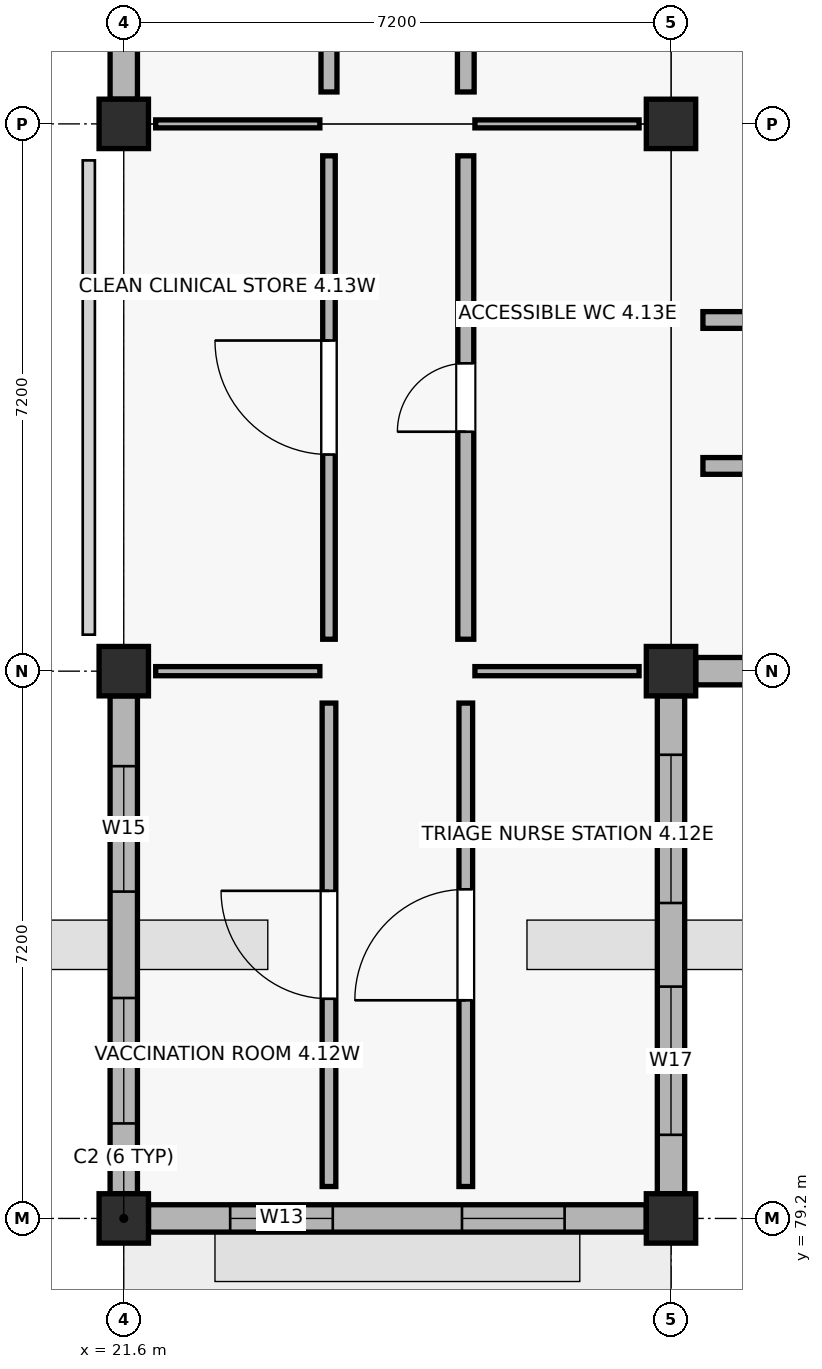
"""IFC4 building model, lengths in metres.
Left out: names, types, materials, properties, quantities, classifications, styles, units other than length and angle.
Written with IfcOpenShell. Run it as: python <this file> out.ifc"""

import sys

from ifc_helpers import new_model, si_unit, direction, frame, frame_2d, origin, origin_2d, place, context, subcontext, project, spatial, rectangle, extrude, element, fill, save


model = new_model("IFC4")
c1 = context("Model", 3, precision=1e-05, world=origin(), true_north=direction((0.0, 1.0)))
c2 = subcontext(c1, "Body", "Model", "MODEL_VIEW")
j1 = project(units=[si_unit("LENGTHUNIT", "METRE"), si_unit("PLANEANGLEUNIT", "RADIAN")], contexts=[c1])
p1 = place(None, origin())
s1 = spatial("IfcSite", under=j1, at=p1, CompositionType="ELEMENT")
p2 = place(p1, origin())
s2 = spatial("IfcBuilding", under=s1, at=p2, CompositionType="ELEMENT")
p3 = place(p2, origin())
s3 = spatial("IfcBuildingStorey", under=s2, at=p3, CompositionType="ELEMENT", Elevation=0.0)
for number, where, z_axis, x_axis in (
    (1, (21.6, 79.2, -0.25), (0.0, 0.0, 1.0), (1.0, 0.0, 0.0)),
    (2, (21.6, 86.4, -0.25), (0.0, 0.0, 1.0), (1.0, 0.0, 0.0)),
    (3, (21.6, 93.6, -0.25), (0.0, 0.0, 1.0), (1.0, 0.0, 0.0)),
    (4, (28.8, 79.2, -0.25), (0.0, 0.0, 1.0), (1.0, 0.0, 0.0)),
    (5, (28.8, 86.4, -0.25), (0.0, 0.0, 1.0), (1.0, 0.0, 0.0)),
    (6, (28.8, 93.6, -0.25), (0.0, 0.0, 1.0), (1.0, 0.0, 0.0)),
):
    element("IfcColumn", number, at=place(p3, frame(where, z_axis=z_axis, x_axis=x_axis)), inside=s3, PredefinedType="COLUMN", context=c2, shape_type="SweptSolid", body=[
        extrude(rectangle(XDim=0.65, YDim=0.65, at=origin_2d()), origin(), (0.0, 0.0, 1.0), 4.75),
    ])
p4 = place(p3, frame((21.925, 79.2, 0.0), z_axis=(0.0, 0.0, 1.0), x_axis=(1.0, 0.0, 0.0)))
e7 = element("IfcWall", 7, at=p4, inside=s3, PredefinedType="SOLIDWALL", context=c2, shape_type="SweptSolid", body=[
    extrude(rectangle(XDim=6.55, YDim=0.36, at=frame_2d((3.275, 0.0))), origin(), (0.0, 0.0, 1.0), 3.47),
])
p5 = place(p4, frame((1.075, 0.0, 0.9)))
e8 = element("IfcOpeningElement", 8, at=p5, cuts=e7, PredefinedType="OPENING", context=c2, shape_type="SweptSolid", body=[
    extrude(rectangle(XDim=1.35, YDim=1.38, at=frame_2d((0.675, 0.69))), frame((0.0, 0.19, 0.0), z_axis=(0.0, -1.0, 0.0), x_axis=(1.0, 0.0, 0.0)), (0.0, 0.0, 1.0), 0.38),
])
p6 = place(p4, frame((4.125, 0.0, 0.9)))
e9 = element("IfcOpeningElement", 9, at=p6, cuts=e7, PredefinedType="OPENING", context=c2, shape_type="SweptSolid", body=[
    extrude(rectangle(XDim=1.35, YDim=1.38, at=frame_2d((0.675, 0.69))), frame((0.0, 0.19, 0.0), z_axis=(0.0, -1.0, 0.0), x_axis=(1.0, 0.0, 0.0)), (0.0, 0.0, 1.0), 0.38),
])
p7 = place(p3, frame((21.6, 86.075, 0.0), z_axis=(0.0, 0.0, 1.0), x_axis=(0.0, -1.0, 0.0)))
e10 = element("IfcWall", 10, at=p7, inside=s3, PredefinedType="SOLIDWALL", context=c2, shape_type="SweptSolid", body=[
    extrude(rectangle(XDim=6.55, YDim=0.36, at=frame_2d((3.275, 0.0))), origin(), (0.0, 0.0, 1.0), 3.52),
])
p8 = place(p7, frame((0.925, 0.0, 0.9)))
e11 = element("IfcOpeningElement", 11, at=p8, cuts=e10, PredefinedType="OPENING", context=c2, shape_type="SweptSolid", body=[
    extrude(rectangle(XDim=1.65, YDim=1.38, at=frame_2d((0.825, 0.69))), frame((0.0, 0.19, 0.0), z_axis=(0.0, -1.0, 0.0), x_axis=(1.0, 0.0, 0.0)), (0.0, 0.0, 1.0), 0.38),
])
p9 = place(p7, frame((3.975, 0.0, 0.9)))
e12 = element("IfcOpeningElement", 12, at=p9, cuts=e10, PredefinedType="OPENING", context=c2, shape_type="SweptSolid", body=[
    extrude(rectangle(XDim=1.65, YDim=1.38, at=frame_2d((0.825, 0.69))), frame((0.0, 0.19, 0.0), z_axis=(0.0, -1.0, 0.0), x_axis=(1.0, 0.0, 0.0)), (0.0, 0.0, 1.0), 0.38),
])
p10 = place(p3, frame((28.8, 79.525, 0.0), z_axis=(0.0, 0.0, 1.0), x_axis=(0.0, 1.0, 0.0)))
e13 = element("IfcWall", 13, at=p10, inside=s3, PredefinedType="SOLIDWALL", context=c2, shape_type="SweptSolid", body=[
    extrude(rectangle(XDim=6.55, YDim=0.36, at=frame_2d((3.275, 0.0))), origin(), (0.0, 0.0, 1.0), 3.52),
])
p11 = place(p10, frame((0.775, 0.0, 0.9)))
e14 = element("IfcOpeningElement", 14, at=p11, cuts=e13, PredefinedType="OPENING", context=c2, shape_type="SweptSolid", body=[
    extrude(rectangle(XDim=1.95, YDim=1.38, at=frame_2d((0.975, 0.69))), frame((0.0, 0.19, 0.0), z_axis=(0.0, -1.0, 0.0), x_axis=(1.0, 0.0, 0.0)), (0.0, 0.0, 1.0), 0.38),
])
p12 = place(p10, frame((3.825, 0.0, 0.9)))
e15 = element("IfcOpeningElement", 15, at=p12, cuts=e13, PredefinedType="OPENING", context=c2, shape_type="SweptSolid", body=[
    extrude(rectangle(XDim=1.95, YDim=1.38, at=frame_2d((0.975, 0.69))), frame((0.0, 0.19, 0.0), z_axis=(0.0, -1.0, 0.0), x_axis=(1.0, 0.0, 0.0)), (0.0, 0.0, 1.0), 0.38),
])
p13 = place(p3, frame((21.6, 100.45, 0.0), z_axis=(0.0, 0.0, 1.0), x_axis=(0.0, -1.0, 0.0)))
e16 = element("IfcWall", 16, at=p13, inside=s3, PredefinedType="SOLIDWALL", context=c2, shape_type="SweptSolid", body=[
    extrude(rectangle(XDim=6.525, YDim=0.36, at=frame_2d((3.262, 0.0))), origin(), (0.0, 0.0, 1.0), 3.52),
])
p14 = place(p13, frame((1.15, 0.0, 0.9)))
e17 = element("IfcOpeningElement", 17, at=p14, cuts=e16, PredefinedType="OPENING", context=c2, shape_type="SweptSolid", body=[
    extrude(rectangle(XDim=1.2, YDim=1.5, at=frame_2d((0.6, 0.75))), frame((0.0, 0.19, 0.0), z_axis=(0.0, -1.0, 0.0), x_axis=(1.0, 0.0, 0.0)), (0.0, 0.0, 1.0), 0.38),
])
p15 = place(p13, frame((4.175, 0.0, 0.9)))
e18 = element("IfcOpeningElement", 18, at=p15, cuts=e16, PredefinedType="OPENING", context=c2, shape_type="SweptSolid", body=[
    extrude(rectangle(XDim=1.2, YDim=1.5, at=frame_2d((0.6, 0.75))), frame((0.0, 0.19, 0.0), z_axis=(0.0, -1.0, 0.0), x_axis=(1.0, 0.0, 0.0)), (0.0, 0.0, 1.0), 0.38),
])
p16 = place(p3, frame((29.125, 86.4, 0.0), z_axis=(0.0, 0.0, 1.0), x_axis=(1.0, 0.0, 0.0)))
e19 = element("IfcWall", 19, at=p16, inside=s3, PredefinedType="SOLIDWALL", context=c2, shape_type="SweptSolid", body=[
    extrude(rectangle(XDim=6.575, YDim=0.36, at=frame_2d((3.288, 0.0))), origin(), (0.0, 0.0, 1.0), 3.47),
])
p17 = place(p16, frame((0.675, 0.0, 0.9)))
e20 = element("IfcOpeningElement", 20, at=p17, cuts=e19, PredefinedType="OPENING", context=c2, shape_type="SweptSolid", body=[
    extrude(rectangle(XDim=2.15, YDim=1.5, at=frame_2d((1.075, 0.75))), frame((0.0, 0.19, 0.0), z_axis=(0.0, -1.0, 0.0), x_axis=(1.0, 0.0, 0.0)), (0.0, 0.0, 1.0), 0.38),
])
p18 = place(p16, frame((3.75, 0.0, 0.9)))
e21 = element("IfcOpeningElement", 21, at=p18, cuts=e19, PredefinedType="OPENING", context=c2, shape_type="SweptSolid", body=[
    extrude(rectangle(XDim=2.15, YDim=1.5, at=frame_2d((1.075, 0.75))), frame((0.0, 0.19, 0.0), z_axis=(0.0, -1.0, 0.0), x_axis=(1.0, 0.0, 0.0)), (0.0, 0.0, 1.0), 0.38),
])
p19 = place(p3, frame((29.22, 89.1, 0.0), z_axis=(0.0, 0.0, 1.0), x_axis=(1.0, 0.0, 0.0)))
e22 = element("IfcWall", 22, at=p19, inside=s3, PredefinedType="SOLIDWALL", context=c2, shape_type="SweptSolid", body=[
    extrude(rectangle(XDim=6.36, YDim=0.22, at=frame_2d((3.18, 0.0))), origin(), (0.0, 0.0, 1.0), 3.36),
])
p20 = place(p19, frame((2.55, 0.0, 0.0)))
e23 = element("IfcOpeningElement", 23, at=p20, cuts=e22, PredefinedType="OPENING", context=c2, shape_type="SweptSolid", body=[
    extrude(rectangle(XDim=1.26, YDim=2.09, at=frame_2d((0.63, 1.045))), frame((0.0, 0.12, 0.0), z_axis=(0.0, -1.0, 0.0), x_axis=(1.0, 0.0, 0.0)), (0.0, 0.0, 1.0), 0.24),
])
p21 = place(p3, frame((29.22, 91.02, 0.0), z_axis=(0.0, 0.0, 1.0), x_axis=(1.0, 0.0, 0.0)))
e24 = element("IfcWall", 24, at=p21, inside=s3, PredefinedType="SOLIDWALL", context=c2, shape_type="SweptSolid", body=[
    extrude(rectangle(XDim=6.36, YDim=0.22, at=frame_2d((3.18, 0.0))), origin(), (0.0, 0.0, 1.0), 3.36),
])
p22 = place(p21, frame((2.53, 0.0, 0.0)))
e25 = element("IfcOpeningElement", 25, at=p22, cuts=e24, PredefinedType="OPENING", context=c2, shape_type="SweptSolid", body=[
    extrude(rectangle(XDim=1.3, YDim=2.09, at=frame_2d((0.65, 1.045))), frame((0.0, 0.12, 0.0), z_axis=(0.0, -1.0, 0.0), x_axis=(1.0, 0.0, 0.0)), (0.0, 0.0, 1.0), 0.24),
])
p23 = place(p3, frame((24.3, 79.62, 0.0), z_axis=(0.0, 0.0, 1.0), x_axis=(0.0, 1.0, 0.0)))
e26 = element("IfcWall", 26, at=p23, inside=s3, PredefinedType="PARTITIONING", context=c2, shape_type="SweptSolid", body=[
    extrude(rectangle(XDim=6.36, YDim=0.18, at=frame_2d((3.18, 0.0))), origin(), (0.0, 0.0, 1.0), 3.36),
])
p24 = place(p23, frame((2.47, 0.0, 0.0)))
e27 = element("IfcOpeningElement", 27, at=p24, cuts=e26, PredefinedType="OPENING", context=c2, shape_type="SweptSolid", body=[
    extrude(rectangle(XDim=1.42, YDim=2.09, at=frame_2d((0.71, 1.045))), frame((0.0, 0.1, 0.0), z_axis=(0.0, -1.0, 0.0), x_axis=(1.0, 0.0, 0.0)), (0.0, 0.0, 1.0), 0.2),
])
p25 = place(p3, frame((22.02, 86.4, 0.0), z_axis=(0.0, 0.0, 1.0), x_axis=(1.0, 0.0, 0.0)))
e28 = element("IfcWall", 28, at=p25, inside=s3, PredefinedType="PARTITIONING", context=c2, shape_type="SweptSolid", body=[
    extrude(rectangle(XDim=2.16, YDim=0.12, at=frame_2d((1.08, 0.0))), origin(), (0.0, 0.0, 1.0), 3.36),
])
p26 = place(p3, frame((26.1, 79.62, 0.0), z_axis=(0.0, 0.0, 1.0), x_axis=(0.0, 1.0, 0.0)))
e29 = element("IfcWall", 29, at=p26, inside=s3, PredefinedType="PARTITIONING", context=c2, shape_type="SweptSolid", body=[
    extrude(rectangle(XDim=6.36, YDim=0.18, at=frame_2d((3.18, 0.0))), origin(), (0.0, 0.0, 1.0), 3.36),
])
p27 = place(p26, frame((2.45, 0.0, 0.0)))
e30 = element("IfcOpeningElement", 30, at=p27, cuts=e29, PredefinedType="OPENING", context=c2, shape_type="SweptSolid", body=[
    extrude(rectangle(XDim=1.46, YDim=2.09, at=frame_2d((0.73, 1.045))), frame((0.0, 0.1, 0.0), z_axis=(0.0, -1.0, 0.0), x_axis=(1.0, 0.0, 0.0)), (0.0, 0.0, 1.0), 0.2),
])
p28 = place(p3, frame((26.22, 86.4, 0.0), z_axis=(0.0, 0.0, 1.0), x_axis=(1.0, 0.0, 0.0)))
e31 = element("IfcWall", 31, at=p28, inside=s3, PredefinedType="PARTITIONING", context=c2, shape_type="SweptSolid", body=[
    extrude(rectangle(XDim=2.16, YDim=0.12, at=frame_2d((1.08, 0.0))), origin(), (0.0, 0.0, 1.0), 3.36),
])
p29 = place(p3, frame((24.3, 86.82, 0.0), z_axis=(0.0, 0.0, 1.0), x_axis=(0.0, 1.0, 0.0)))
e32 = element("IfcWall", 32, at=p29, inside=s3, PredefinedType="PARTITIONING", context=c2, shape_type="SweptSolid", body=[
    extrude(rectangle(XDim=6.36, YDim=0.165, at=frame_2d((3.18, 0.0))), origin(), (0.0, 0.0, 1.0), 3.36),
])
p30 = place(p29, frame((2.43, 0.0, 0.0)))
e33 = element("IfcOpeningElement", 33, at=p30, cuts=e32, PredefinedType="OPENING", context=c2, shape_type="SweptSolid", body=[
    extrude(rectangle(XDim=1.5, YDim=2.09, at=frame_2d((0.75, 1.045))), frame((0.0, 0.093, 0.0), z_axis=(0.0, -1.0, 0.0), x_axis=(1.0, 0.0, 0.0)), (0.0, 0.0, 1.0), 0.185),
])
p31 = place(p3, frame((22.02, 93.6, 0.0), z_axis=(0.0, 0.0, 1.0), x_axis=(1.0, 0.0, 0.0)))
e34 = element("IfcWall", 34, at=p31, inside=s3, PredefinedType="PARTITIONING", context=c2, shape_type="SweptSolid", body=[
    extrude(rectangle(XDim=2.16, YDim=0.105, at=frame_2d((1.08, 0.0))), origin(), (0.0, 0.0, 1.0), 3.36),
])
p32 = place(p3, frame((26.1, 86.82, 0.0), z_axis=(0.0, 0.0, 1.0), x_axis=(0.0, 1.0, 0.0)))
e35 = element("IfcWall", 35, at=p32, inside=s3, PredefinedType="PLUMBINGWALL", context=c2, shape_type="SweptSolid", body=[
    extrude(rectangle(XDim=6.36, YDim=0.21, at=frame_2d((3.18, 0.0))), origin(), (0.0, 0.0, 1.0), 3.36),
])
p33 = place(p32, frame((2.73, 0.0, 0.0)))
e36 = element("IfcOpeningElement", 36, at=p33, cuts=e35, PredefinedType="OPENING", context=c2, shape_type="SweptSolid", body=[
    extrude(rectangle(XDim=0.9, YDim=2.14, at=frame_2d((0.45, 1.07))), frame((0.0, 0.115, 0.0), z_axis=(0.0, -1.0, 0.0), x_axis=(1.0, 0.0, 0.0)), (0.0, 0.0, 1.0), 0.23),
])
p34 = place(p3, frame((26.22, 93.6, 0.0), z_axis=(0.0, 0.0, 1.0), x_axis=(1.0, 0.0, 0.0)))
e37 = element("IfcWall", 37, at=p34, inside=s3, PredefinedType="PARTITIONING", context=c2, shape_type="SweptSolid", body=[
    extrude(rectangle(XDim=2.16, YDim=0.105, at=frame_2d((1.08, 0.0))), origin(), (0.0, 0.0, 1.0), 3.36),
])
p35 = place(p3, frame((24.3, 94.02, 0.0), z_axis=(0.0, 0.0, 1.0), x_axis=(0.0, 1.0, 0.0)))
e38 = element("IfcWall", 38, at=p35, inside=s3, PredefinedType="PLUMBINGWALL", context=c2, shape_type="SweptSolid", body=[
    extrude(rectangle(XDim=6.36, YDim=0.21, at=frame_2d((3.18, 0.0))), origin(), (0.0, 0.0, 1.0), 3.36),
])
p36 = place(p35, frame((2.71, 0.0, 0.0)))
e39 = element("IfcOpeningElement", 39, at=p36, cuts=e38, PredefinedType="OPENING", context=c2, shape_type="SweptSolid", body=[
    extrude(rectangle(XDim=0.94, YDim=2.14, at=frame_2d((0.47, 1.07))), frame((0.0, 0.115, 0.0), z_axis=(0.0, -1.0, 0.0), x_axis=(1.0, 0.0, 0.0)), (0.0, 0.0, 1.0), 0.23),
])
p37 = place(p3, frame((26.1, 94.02, 0.0), z_axis=(0.0, 0.0, 1.0), x_axis=(0.0, 1.0, 0.0)))
e40 = element("IfcWall", 40, at=p37, inside=s3, PredefinedType="SOLIDWALL", context=c2, shape_type="SweptSolid", body=[
    extrude(rectangle(XDim=6.36, YDim=0.22, at=frame_2d((3.18, 0.0))), origin(), (0.0, 0.0, 1.0), 3.36),
])
p38 = place(p37, frame((2.69, 0.0, 0.0)))
e41 = element("IfcOpeningElement", 41, at=p38, cuts=e40, PredefinedType="OPENING", context=c2, shape_type="SweptSolid", body=[
    extrude(rectangle(XDim=0.98, YDim=2.14, at=frame_2d((0.49, 1.07))), frame((0.0, 0.12, 0.0), z_axis=(0.0, -1.0, 0.0), x_axis=(1.0, 0.0, 0.0)), (0.0, 0.0, 1.0), 0.24),
])
p39 = place(p5, origin())
e42 = element("IfcWindow", 42, at=p39, inside=s3, PartitioningType="SINGLE_PANEL", PredefinedType="WINDOW", context=c2, shape_type="SweptSolid", body=[
    extrude(rectangle(XDim=1.35, YDim=1.38, at=frame_2d((0.675, 0.69))), frame((0.0, 0.03, 0.0), z_axis=(0.0, -1.0, 0.0), x_axis=(1.0, 0.0, 0.0)), (0.0, 0.0, 1.0), 0.06),
])
fill(e8, e42)
p40 = place(p6, origin())
e43 = element("IfcWindow", 43, at=p40, inside=s3, PartitioningType="SINGLE_PANEL", PredefinedType="WINDOW", context=c2, shape_type="SweptSolid", body=[
    extrude(rectangle(XDim=1.35, YDim=1.38, at=frame_2d((0.675, 0.69))), frame((0.0, 0.03, 0.0), z_axis=(0.0, -1.0, 0.0), x_axis=(1.0, 0.0, 0.0)), (0.0, 0.0, 1.0), 0.06),
])
fill(e9, e43)
p41 = place(p8, origin())
e44 = element("IfcWindow", 44, at=p41, inside=s3, PartitioningType="SINGLE_PANEL", PredefinedType="WINDOW", context=c2, shape_type="SweptSolid", body=[
    extrude(rectangle(XDim=1.65, YDim=1.38, at=frame_2d((0.825, 0.69))), frame((0.0, 0.03, 0.0), z_axis=(0.0, -1.0, 0.0), x_axis=(1.0, 0.0, 0.0)), (0.0, 0.0, 1.0), 0.06),
])
fill(e11, e44)
p42 = place(p9, origin())
e45 = element("IfcWindow", 45, at=p42, inside=s3, PartitioningType="SINGLE_PANEL", PredefinedType="WINDOW", context=c2, shape_type="SweptSolid", body=[
    extrude(rectangle(XDim=1.65, YDim=1.38, at=frame_2d((0.825, 0.69))), frame((0.0, 0.03, 0.0), z_axis=(0.0, -1.0, 0.0), x_axis=(1.0, 0.0, 0.0)), (0.0, 0.0, 1.0), 0.06),
])
fill(e12, e45)
p43 = place(p11, origin())
e46 = element("IfcWindow", 46, at=p43, inside=s3, PartitioningType="SINGLE_PANEL", PredefinedType="WINDOW", context=c2, shape_type="SweptSolid", body=[
    extrude(rectangle(XDim=1.95, YDim=1.38, at=frame_2d((0.975, 0.69))), frame((0.0, 0.03, 0.0), z_axis=(0.0, -1.0, 0.0), x_axis=(1.0, 0.0, 0.0)), (0.0, 0.0, 1.0), 0.06),
])
fill(e14, e46)
p44 = place(p12, origin())
e47 = element("IfcWindow", 47, at=p44, inside=s3, PartitioningType="SINGLE_PANEL", PredefinedType="WINDOW", context=c2, shape_type="SweptSolid", body=[
    extrude(rectangle(XDim=1.95, YDim=1.38, at=frame_2d((0.975, 0.69))), frame((0.0, 0.03, 0.0), z_axis=(0.0, -1.0, 0.0), x_axis=(1.0, 0.0, 0.0)), (0.0, 0.0, 1.0), 0.06),
])
fill(e15, e47)
p45 = place(p24, origin())
e48 = element("IfcDoor", 48, at=p45, inside=s3, OperationType="SINGLE_SWING_RIGHT", PredefinedType="DOOR", context=c2, shape_type="SweptSolid", body=[
    extrude(rectangle(XDim=1.42, YDim=2.09, at=frame_2d((0.71, 1.045))), frame((0.0, 0.025, 0.0), z_axis=(0.0, -1.0, 0.0), x_axis=(1.0, 0.0, 0.0)), (0.0, 0.0, 1.0), 0.05),
])
fill(e27, e48)
p46 = place(p27, origin())
e49 = element("IfcDoor", 49, at=p46, inside=s3, OperationType="SINGLE_SWING_LEFT", PredefinedType="DOOR", context=c2, shape_type="SweptSolid", body=[
    extrude(rectangle(XDim=1.46, YDim=2.09, at=frame_2d((0.73, 1.045))), frame((0.0, 0.025, 0.0), z_axis=(0.0, -1.0, 0.0), x_axis=(1.0, 0.0, 0.0)), (0.0, 0.0, 1.0), 0.05),
])
fill(e30, e49)
p47 = place(p30, origin())
e50 = element("IfcDoor", 50, at=p47, inside=s3, OperationType="SINGLE_SWING_RIGHT", PredefinedType="DOOR", context=c2, shape_type="SweptSolid", body=[
    extrude(rectangle(XDim=1.5, YDim=2.09, at=frame_2d((0.75, 1.045))), frame((0.0, 0.025, 0.0), z_axis=(0.0, -1.0, 0.0), x_axis=(1.0, 0.0, 0.0)), (0.0, 0.0, 1.0), 0.05),
])
fill(e33, e50)
p48 = place(p33, origin())
e51 = element("IfcDoor", 51, at=p48, inside=s3, OperationType="SINGLE_SWING_LEFT", PredefinedType="DOOR", context=c2, shape_type="SweptSolid", body=[
    extrude(rectangle(XDim=0.9, YDim=2.14, at=frame_2d((0.45, 1.07))), frame((0.0, 0.025, 0.0), z_axis=(0.0, -1.0, 0.0), x_axis=(1.0, 0.0, 0.0)), (0.0, 0.0, 1.0), 0.05),
])
fill(e36, e51)
save(model, sys.argv[1])
